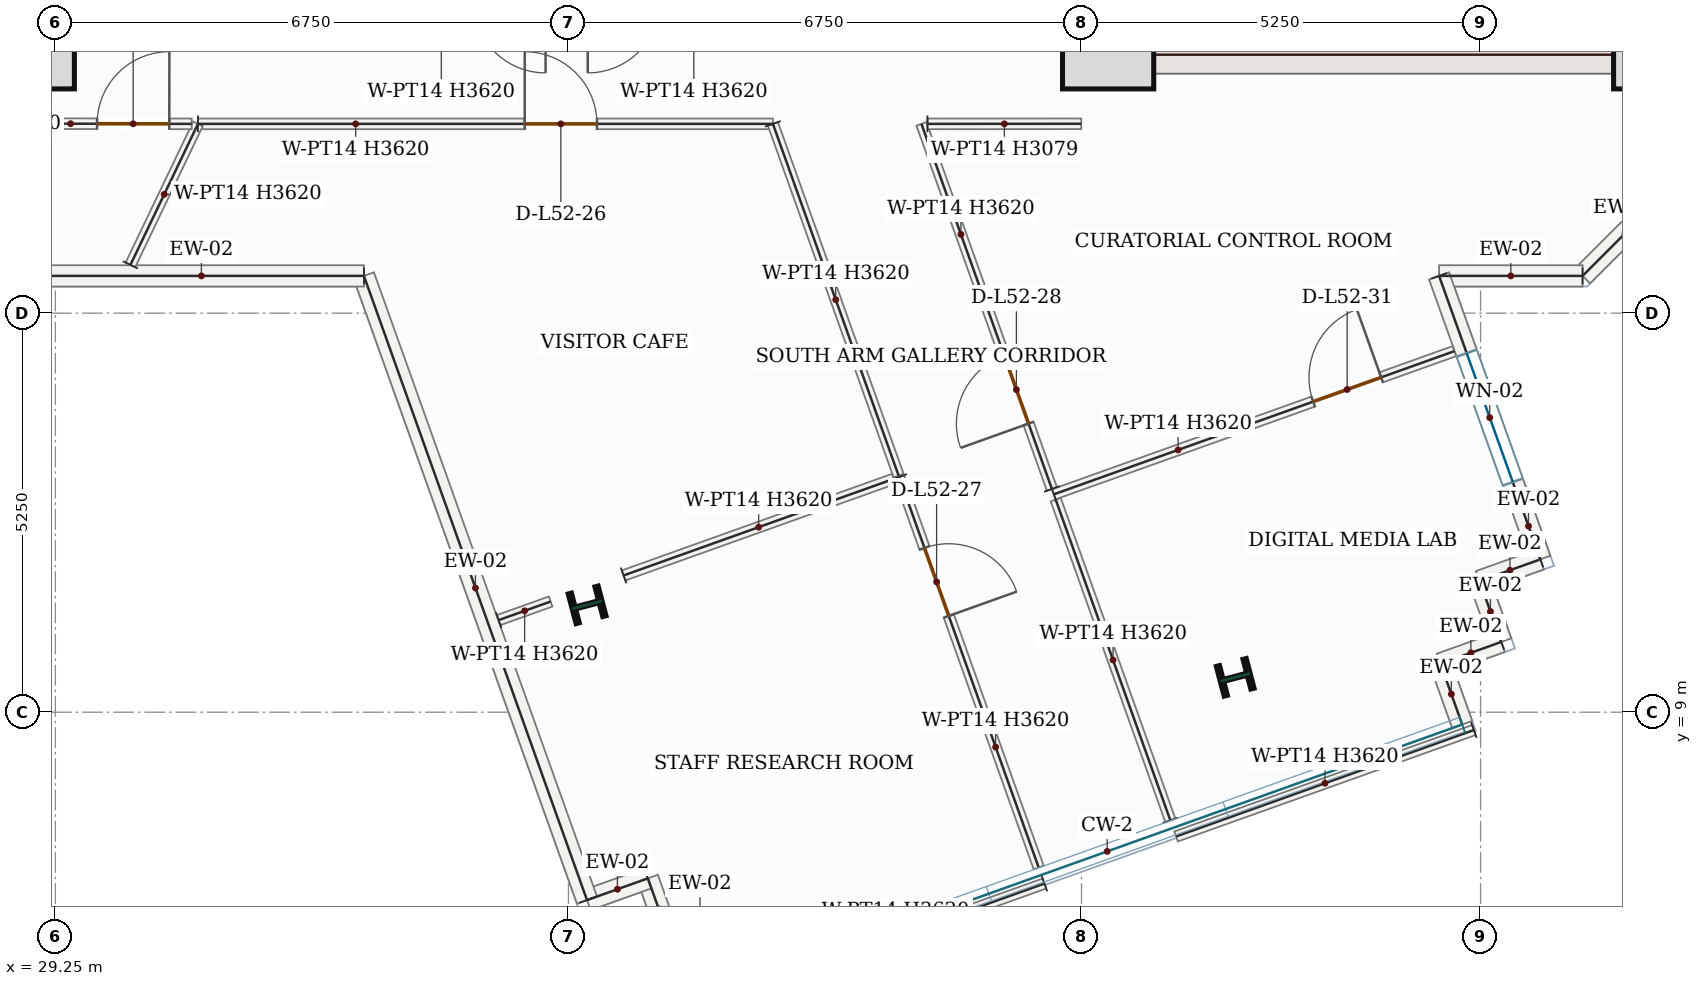
"""IFC4 building model, lengths in metres.
Left out: names, types, materials, properties, quantities, classifications, styles, units other than length and angle.
Written with IfcOpenShell. Run it as: python <this file> out.ifc"""

import sys

from ifc_helpers import new_model, si_unit, direction, frame, frame_2d, origin, origin_2d, place, context, subcontext, project, spatial, rectangle, i_section, extrude, source, transform, mapped, element, fill, save


model = new_model("IFC4")
c1 = context("Model", 3, precision=1e-05, world=origin(), true_north=direction((0.0, 1.0)))
c2 = subcontext(c1, "Body", "Model", "MODEL_VIEW")
j1 = project(units=[si_unit("LENGTHUNIT", "METRE"), si_unit("PLANEANGLEUNIT", "RADIAN")], contexts=[c1])
p1 = place(None, origin())
s1 = spatial("IfcSite", under=j1, at=p1, CompositionType="ELEMENT")
p2 = place(p1, origin())
s2 = spatial("IfcBuilding", under=s1, at=p2, CompositionType="ELEMENT")
p3 = place(p2, frame((0.0, 0.0, 221.4)))
s3 = spatial("IfcBuildingStorey", under=s2, at=p3, CompositionType="ELEMENT", Elevation=221.4)
p4 = place(p3, frame((29.0, 17.4, 0.0), z_axis=(0.0, 0.0, 1.0), x_axis=(0.0, 1.0, 0.0)))
e1 = element("IfcWall", 1, at=p4, inside=s3, PredefinedType="SHEAR", context=c2, shape_type="SweptSolid", body=[
    extrude(rectangle(XDim=8.55, YDim=0.5, at=frame_2d((4.275, 0.0))), origin(), (0.0, 0.0, 1.0), 3.62),
])
p5 = place(p4, frame((6.65, 0.0, 0.0)))
e2 = element("IfcOpeningElement", 2, at=p5, cuts=e1, PredefinedType="OPENING", context=c2, shape_type="SweptSolid", body=[
    extrude(rectangle(XDim=1.1, YDim=2.2, at=frame_2d((0.55, 1.1))), frame((0.0, 0.26, 0.0), z_axis=(0.0, -1.0, 0.0), x_axis=(1.0, 0.0, 0.0)), (0.0, 0.0, 1.0), 0.52),
])
p6 = place(p4, frame((2.15, 0.0, 0.0)))
e3 = element("IfcOpeningElement", 3, at=p6, cuts=e1, PredefinedType="OPENING", context=c2, shape_type="SweptSolid", body=[
    extrude(rectangle(XDim=0.88, YDim=2.1, at=frame_2d((0.44, 1.05))), frame((0.0, 0.26, 0.0), z_axis=(0.0, -1.0, 0.0), x_axis=(1.0, 0.0, 0.0)), (0.0, 0.0, 1.0), 0.52),
])
p7 = place(p4, frame((4.25, 0.0, 0.0)))
e4 = element("IfcOpeningElement", 4, at=p7, cuts=e1, PredefinedType="OPENING", context=c2, shape_type="SweptSolid", body=[
    extrude(rectangle(XDim=0.88, YDim=2.1, at=frame_2d((0.44, 1.05))), frame((0.0, 0.26, 0.0), z_axis=(0.0, -1.0, 0.0), x_axis=(1.0, 0.0, 0.0)), (0.0, 0.0, 1.0), 0.52),
])
p8 = place(p3, frame((43.0, 17.4, 0.0), z_axis=(0.0, 0.0, 1.0), x_axis=(0.0, 1.0, 0.0)))
e5 = element("IfcWall", 5, at=p8, inside=s3, PredefinedType="SHEAR", context=c2, shape_type="SweptSolid", body=[
    extrude(rectangle(XDim=8.55, YDim=0.5, at=frame_2d((4.275, 0.0))), origin(), (0.0, 0.0, 1.0), 3.62),
])
p9 = place(p8, frame((6.65, 0.0, 0.0)))
e6 = element("IfcOpeningElement", 6, at=p9, cuts=e5, PredefinedType="OPENING", context=c2, shape_type="SweptSolid", body=[
    extrude(rectangle(XDim=1.1, YDim=2.2, at=frame_2d((0.55, 1.1))), frame((0.0, 0.26, 0.0), z_axis=(0.0, -1.0, 0.0), x_axis=(1.0, 0.0, 0.0)), (0.0, 0.0, 1.0), 0.52),
])
p10 = place(p8, frame((1.75, 0.0, 0.0)))
e7 = element("IfcOpeningElement", 7, at=p10, cuts=e5, PredefinedType="OPENING", context=c2, shape_type="SweptSolid", body=[
    extrude(rectangle(XDim=1.3, YDim=2.2, at=frame_2d((0.65, 1.1))), frame((0.0, 0.26, 0.0), z_axis=(0.0, -1.0, 0.0), x_axis=(1.0, 0.0, 0.0)), (0.0, 0.0, 1.0), 0.52),
])
p11 = place(p8, frame((4.55, 0.0, 0.0)))
e8 = element("IfcOpeningElement", 8, at=p11, cuts=e5, PredefinedType="OPENING", context=c2, shape_type="SweptSolid", body=[
    extrude(rectangle(XDim=0.88, YDim=2.1, at=frame_2d((0.44, 1.05))), frame((0.0, 0.26, 0.0), z_axis=(0.0, -1.0, 0.0), x_axis=(1.0, 0.0, 0.0)), (0.0, 0.0, 1.0), 0.52),
])
m1 = source(origin(), c2, "Body", "SweptSolid", [
    extrude(rectangle(XDim=7.0, YDim=0.5, at=frame_2d((3.5, 0.0))), origin(), (0.0, 0.0, 1.0), 3.62),
])
p12 = place(p3, frame((43.25, 17.65, 0.0), z_axis=(0.0, 0.0, 1.0), x_axis=(1.0, 0.0, 0.0)))
e9 = element("IfcWall", 9, at=p12, inside=s3, PredefinedType="SHEAR", context=c2, shape_type="MappedRepresentation", body=[
    mapped(m1, transform((0.0, 0.0, 0.0), x_axis=(1.0, 0.0, 0.0), y_axis=(0.0, 1.0, 0.0), z_axis=(0.0, 0.0, 1.0), scale=1.0)),
])
m2 = source(origin(), c2, "Body", "SweptSolid", [
    extrude(rectangle(XDim=1.2, YDim=1.2, at=origin_2d()), origin(), (0.0, 0.0, 1.0), 3.9),
])
for number, where, z_axis, x_axis in (
    (10, (28.9, 17.8, 0.0), (0.0, 0.0, 1.0), (1.0, 0.0, 0.0)),
    (11, (43.1, 17.8, 0.0), (0.0, 0.0, 1.0), (1.0, 0.0, 0.0)),
    (12, (50.35, 17.8, 0.0), (0.0, 0.0, 1.0), (1.0, 0.0, 0.0)),
):
    element("IfcColumn", number, at=place(p3, frame(where, z_axis=z_axis, x_axis=x_axis)), inside=s3, PredefinedType="COLUMN", context=c2, shape_type="MappedRepresentation", body=[
        mapped(m2, transform((0.0, 0.0, 0.0), x_axis=(1.0, 0.0, 0.0), y_axis=(0.0, 1.0, 0.0), z_axis=(0.0, 0.0, 1.0), scale=1.0)),
    ])
m3 = source(origin(), c2, "Body", "SweptSolid", [
    extrude(i_section(OverallWidth=0.404, OverallDepth=0.407, WebThickness=0.027, FlangeThickness=0.044, FilletRadius=0.018, at=origin_2d()), origin(), (0.0, 0.0, 1.0), 3.9),
])
for number, where, z_axis, x_axis in (
    (13, (36.245, 10.412, 0.0), (0.0, 0.0, 1.0), (-0.255, 0.967, 0.0)),
    (14, (44.772, 9.459, 0.0), (0.0, 0.0, 1.0), (-0.255, 0.967, 0.0)),
):
    element("IfcColumn", number, at=place(p3, frame(where, z_axis=z_axis, x_axis=x_axis)), inside=s3, PredefinedType="COLUMN", context=c2, shape_type="MappedRepresentation", body=[
        mapped(m3, transform((0.0, 0.0, 0.0), x_axis=(1.0, 0.0, 0.0), y_axis=(0.0, 1.0, 0.0), z_axis=(0.0, 0.0, 1.0), scale=1.0)),
    ])
p13 = place(p3, frame((53.06, 18.458, 0.0), z_axis=(0.0, 0.0, 1.0), x_axis=(-0.707106781187, -0.707106781187, 0.0)))
e15 = element("IfcWall", 15, at=p13, inside=s3, PredefinedType="SOLIDWALL", context=c2, shape_type="SweptSolid", body=[
    extrude(rectangle(XDim=5.258, YDim=0.28, at=frame_2d((2.629, 0.0))), origin(), (0.0, 0.0, 1.0), 3.62),
])
p14 = place(p13, frame((1.729, 0.0, 0.85)))
e16 = element("IfcOpeningElement", 16, at=p14, cuts=e15, PredefinedType="OPENING", context=c2, shape_type="SweptSolid", body=[
    extrude(rectangle(XDim=1.8, YDim=1.75, at=frame_2d((0.9, 0.875))), frame((0.0, 0.15, 0.0), z_axis=(0.0, -1.0, 0.0), x_axis=(1.0, 0.0, 0.0)), (0.0, 0.0, 1.0), 0.3),
])
m4 = source(origin(), c2, "Body", "SweptSolid", [
    extrude(rectangle(XDim=1.888, YDim=0.28, at=frame_2d((0.944, 0.0))), origin(), (0.0, 0.0, 1.0), 3.62),
])
p15 = place(p3, frame((49.342, 14.74, 0.0), z_axis=(0.0, 0.0, 1.0), x_axis=(-1.0, 0.0, 0.0)))
e17 = element("IfcWall", 17, at=p15, inside=s3, PredefinedType="SOLIDWALL", context=c2, shape_type="MappedRepresentation", body=[
    mapped(m4, transform((0.0, 0.0, 0.0), x_axis=(1.0, 0.0, 0.0), y_axis=(0.0, 1.0, 0.0), z_axis=(0.0, 0.0, 1.0), scale=1.0)),
])
p16 = place(p3, frame((47.454, 14.74, 0.0), z_axis=(0.0, 0.0, 1.0), x_axis=(0.336590223561, -0.941651220677, 0.0)))
e18 = element("IfcWall", 18, at=p16, inside=s3, PredefinedType="SOLIDWALL", context=c2, shape_type="SweptSolid", body=[
    extrude(rectangle(XDim=3.96, YDim=0.28, at=frame_2d((1.98, 0.0))), origin(), (0.0, 0.0, 1.0), 3.62),
])
p17 = place(p16, frame((1.08, 0.0, 0.85)))
e19 = element("IfcOpeningElement", 19, at=p17, cuts=e18, PredefinedType="OPENING", context=c2, shape_type="SweptSolid", body=[
    extrude(rectangle(XDim=1.8, YDim=1.75, at=frame_2d((0.9, 0.875))), frame((0.0, 0.15, 0.0), z_axis=(0.0, -1.0, 0.0), x_axis=(1.0, 0.0, 0.0)), (0.0, 0.0, 1.0), 0.3),
])
m5 = source(origin(), c2, "Body", "SweptSolid", [
    extrude(rectangle(XDim=0.85, YDim=0.28, at=frame_2d((0.425, 0.0))), origin(), (0.0, 0.0, 1.0), 3.62),
])
p18 = place(p3, frame((48.787, 11.011, 0.0), z_axis=(0.0, 0.0, 1.0), x_axis=(-0.941657417713, -0.336572886112, 0.0)))
e20 = element("IfcWall", 20, at=p18, inside=s3, PredefinedType="SOLIDWALL", context=c2, shape_type="MappedRepresentation", body=[
    mapped(m5, transform((0.0, 0.0, 0.0), x_axis=(1.0, 0.0, 0.0), y_axis=(0.0, 1.0, 0.0), z_axis=(0.0, 0.0, 1.0), scale=1.0)),
])
m6 = source(origin(), c2, "Body", "SweptSolid", [
    extrude(rectangle(XDim=0.85, YDim=0.28, at=frame_2d((0.425, 0.0))), origin(), (0.0, 0.0, 1.0), 3.62),
])
for number, where, z_axis, x_axis in (
    (21, (47.987, 10.725, 0.0), (0.0, 0.0, 1.0), (0.337, -0.942, 0.0)),
    (22, (48.273, 9.924, 0.0), (0.0, 0.0, 1.0), (-0.942, -0.337, 0.0)),
    (23, (47.472, 9.638, 0.0), (0.0, 0.0, 1.0), (0.336, -0.942, 0.0)),
    (24, (37.331, 6.014, 0.0), (0.0, 0.0, 1.0), (-0.337, 0.942, 0.0)),
    (25, (37.044, 6.814, 0.0), (0.0, 0.0, 1.0), (-0.942, -0.337, 0.0)),
):
    element("IfcWall", number, at=place(p3, frame(where, z_axis=z_axis, x_axis=x_axis)), inside=s3, PredefinedType="SOLIDWALL", context=c2, shape_type="MappedRepresentation", body=[
        mapped(m6, transform((0.0, 0.0, 0.0), x_axis=(1.0, 0.0, 0.0), y_axis=(0.0, 1.0, 0.0), z_axis=(0.0, 0.0, 1.0), scale=1.0)),
    ])
m7 = source(origin(), c2, "Body", "SweptSolid", [
    extrude(rectangle(XDim=8.721, YDim=0.28, at=frame_2d((4.36, 0.0))), origin(), (0.0, 0.0, 1.0), 3.62),
])
p19 = place(p3, frame((36.244, 6.528, 0.0), z_axis=(0.0, 0.0, 1.0), x_axis=(-0.336554520074, 0.941663982011, 0.0)))
e26 = element("IfcWall", 26, at=p19, inside=s3, PredefinedType="SOLIDWALL", context=c2, shape_type="MappedRepresentation", body=[
    mapped(m7, transform((0.0, 0.0, 0.0), x_axis=(1.0, 0.0, 0.0), y_axis=(0.0, 1.0, 0.0), z_axis=(0.0, 0.0, 1.0), scale=1.0)),
])
p20 = place(p3, frame((33.309, 14.74, 0.0), z_axis=(0.0, 0.0, 1.0), x_axis=(-1.0, 0.0, 0.0)))
e27 = element("IfcWall", 27, at=p20, inside=s3, PredefinedType="SOLIDWALL", context=c2, shape_type="SweptSolid", body=[
    extrude(rectangle(XDim=10.651, YDim=0.28, at=frame_2d((5.326, 0.0))), origin(), (0.0, 0.0, 1.0), 3.62),
])
p21 = place(p20, frame((7.681, 0.0, 0.0)))
e28 = element("IfcOpeningElement", 28, at=p21, cuts=e27, PredefinedType="OPENING", context=c2, shape_type="SweptSolid", body=[
    extrude(rectangle(XDim=1.05, YDim=2.15, at=frame_2d((0.525, 1.075))), frame((0.0, 0.15, 0.0), z_axis=(0.0, -1.0, 0.0), x_axis=(1.0, 0.0, 0.0)), (0.0, 0.0, 1.0), 0.3),
])
p22 = place(p20, frame((4.426, 0.0, 0.85)))
e29 = element("IfcOpeningElement", 29, at=p22, cuts=e27, PredefinedType="OPENING", context=c2, shape_type="SweptSolid", body=[
    extrude(rectangle(XDim=1.8, YDim=1.75, at=frame_2d((0.9, 0.875))), frame((0.0, 0.15, 0.0), z_axis=(0.0, -1.0, 0.0), x_axis=(1.0, 0.0, 0.0)), (0.0, 0.0, 1.0), 0.3),
])
p23 = place(p3, frame((42.386, 11.866, 0.0), z_axis=(0.0, 0.0, 1.0), x_axis=(0.94166093099, 0.336563056568, 0.0)))
e30 = element("IfcWall", 30, at=p23, inside=s3, PredefinedType="PARTITIONING", context=c2, shape_type="SweptSolid", body=[
    extrude(rectangle(XDim=5.595, YDim=0.14, at=frame_2d((2.797, 0.0))), origin(), (0.0, 0.0, 1.0), 3.62),
])
p24 = place(p23, frame((3.623, 0.0, 0.0)))
e31 = element("IfcOpeningElement", 31, at=p24, cuts=e30, PredefinedType="OPENING", context=c2, shape_type="SweptSolid", body=[
    extrude(rectangle(XDim=0.95, YDim=2.15, at=frame_2d((0.475, 1.075))), frame((0.0, 0.08, 0.0), z_axis=(0.0, -1.0, 0.0), x_axis=(1.0, 0.0, 0.0)), (0.0, 0.0, 1.0), 0.16),
])
m8 = source(origin(), c2, "Body", "SweptSolid", [
    extrude(rectangle(XDim=4.16, YDim=0.14, at=frame_2d((2.08, 0.0))), origin(), (0.0, 0.0, 1.0), 3.62),
])
p25 = place(p3, frame((47.912, 8.765, 0.0), z_axis=(0.0, 0.0, 1.0), x_axis=(-0.94167417377, -0.336526002642, 0.0)))
e32 = element("IfcWall", 32, at=p25, inside=s3, PredefinedType="PARTITIONING", context=c2, shape_type="MappedRepresentation", body=[
    mapped(m8, transform((0.0, 0.0, 0.0), x_axis=(1.0, 0.0, 0.0), y_axis=(0.0, 1.0, 0.0), z_axis=(0.0, 0.0, 1.0), scale=1.0)),
])
m9 = source(origin(), c2, "Body", "SweptSolid", [
    extrude(rectangle(XDim=4.48, YDim=0.14, at=frame_2d((2.24, 0.0))), origin(), (0.0, 0.0, 1.0), 3.62),
])
p26 = place(p3, frame((43.919, 7.577, 0.0), z_axis=(0.0, 0.0, 1.0), x_axis=(-0.336557324255, 0.941662979781, 0.0)))
e33 = element("IfcWall", 33, at=p26, inside=s3, PredefinedType="PARTITIONING", context=c2, shape_type="MappedRepresentation", body=[
    mapped(m9, transform((0.0, 0.0, 0.0), x_axis=(1.0, 0.0, 0.0), y_axis=(0.0, 1.0, 0.0), z_axis=(0.0, 0.0, 1.0), scale=1.0)),
])
p27 = place(p3, frame((40.35, 12.094, 0.0), z_axis=(0.0, 0.0, 1.0), x_axis=(0.336563203689, -0.941660878407, 0.0)))
e34 = element("IfcWall", 34, at=p27, inside=s3, PredefinedType="PARTITIONING", context=c2, shape_type="SweptSolid", body=[
    extrude(rectangle(XDim=5.455, YDim=0.14, at=frame_2d((2.728, 0.0))), origin(), (0.0, 0.0, 1.0), 3.62),
])
p28 = place(p27, frame((0.991, 0.0, 0.0)))
e35 = element("IfcOpeningElement", 35, at=p28, cuts=e34, PredefinedType="OPENING", context=c2, shape_type="SweptSolid", body=[
    extrude(rectangle(XDim=0.95, YDim=2.15, at=frame_2d((0.475, 1.075))), frame((0.0, 0.08, 0.0), z_axis=(0.0, -1.0, 0.0), x_axis=(1.0, 0.0, 0.0)), (0.0, 0.0, 1.0), 0.16),
])
p29 = place(p3, frame((42.262, 6.746, 0.0), z_axis=(0.0, 0.0, 1.0), x_axis=(-0.94167417377, -0.336526002642, 0.0)))
e36 = element("IfcWall", 36, at=p29, inside=s3, PredefinedType="PARTITIONING", context=c2, shape_type="MappedRepresentation", body=[
    mapped(m8, transform((0.0, 0.0, 0.0), x_axis=(1.0, 0.0, 0.0), y_axis=(0.0, 1.0, 0.0), z_axis=(0.0, 0.0, 1.0), scale=1.0)),
])
m10 = source(origin(), c2, "Body", "SweptSolid", [
    extrude(rectangle(XDim=0.726, YDim=0.14, at=frame_2d((0.363, 0.0))), origin(), (0.0, 0.0, 1.0), 3.62),
])
p30 = place(p3, frame((35.082, 10.212, 0.0), z_axis=(0.0, 0.0, 1.0), x_axis=(0.941779940629, 0.33622989669, 0.0)))
e37 = element("IfcWall", 37, at=p30, inside=s3, PredefinedType="PARTITIONING", context=c2, shape_type="MappedRepresentation", body=[
    mapped(m10, transform((0.0, 0.0, 0.0), x_axis=(1.0, 0.0, 0.0), y_axis=(0.0, 1.0, 0.0), z_axis=(0.0, 0.0, 1.0), scale=1.0)),
])
m11 = source(origin(), c2, "Body", "SweptSolid", [
    extrude(rectangle(XDim=3.774, YDim=0.14, at=frame_2d((1.887, 0.0))), origin(), (0.0, 0.0, 1.0), 3.62),
])
p31 = place(p3, frame((36.725, 10.799, 0.0), z_axis=(0.0, 0.0, 1.0), x_axis=(0.94166578898, 0.336549464216, 0.0)))
e38 = element("IfcWall", 38, at=p31, inside=s3, PredefinedType="PARTITIONING", context=c2, shape_type="MappedRepresentation", body=[
    mapped(m11, transform((0.0, 0.0, 0.0), x_axis=(1.0, 0.0, 0.0), y_axis=(0.0, 1.0, 0.0), z_axis=(0.0, 0.0, 1.0), scale=1.0)),
])
p32 = place(p3, frame((31.126, 16.74, 0.0), z_axis=(0.0, 0.0, 1.0), x_axis=(1.0, 0.0, 0.0)))
e39 = element("IfcWall", 39, at=p32, inside=s3, PredefinedType="PARTITIONING", context=c2, shape_type="SweptSolid", body=[
    extrude(rectangle(XDim=7.564, YDim=0.14, at=frame_2d((3.782, 0.0))), origin(), (0.0, 0.0, 1.0), 3.62),
])
p33 = place(p32, frame((4.299, 0.0, 0.0)))
e40 = element("IfcOpeningElement", 40, at=p33, cuts=e39, PredefinedType="OPENING", context=c2, shape_type="SweptSolid", body=[
    extrude(rectangle(XDim=0.95, YDim=2.15, at=frame_2d((0.475, 1.075))), frame((0.0, 0.08, 0.0), z_axis=(0.0, -1.0, 0.0), x_axis=(1.0, 0.0, 0.0)), (0.0, 0.0, 1.0), 0.16),
])
m12 = source(origin(), c2, "Body", "SweptSolid", [
    extrude(rectangle(XDim=4.913, YDim=0.14, at=frame_2d((2.457, 0.0))), origin(), (0.0, 0.0, 1.0), 3.62),
])
p34 = place(p3, frame((38.69, 16.74, 0.0), z_axis=(0.0, 0.0, 1.0), x_axis=(0.336547288081, -0.941666566724, 0.0)))
e41 = element("IfcWall", 41, at=p34, inside=s3, PredefinedType="PARTITIONING", context=c2, shape_type="MappedRepresentation", body=[
    mapped(m12, transform((0.0, 0.0, 0.0), x_axis=(1.0, 0.0, 0.0), y_axis=(0.0, 1.0, 0.0), z_axis=(0.0, 0.0, 1.0), scale=1.0)),
])
m13 = source(origin(), c2, "Body", "SweptSolid", [
    extrude(rectangle(XDim=2.057, YDim=0.14, at=frame_2d((1.028, 0.0))), origin(), (0.0, 0.0, 1.0), 3.62),
])
p35 = place(p3, frame((30.237, 14.885, 0.0), z_axis=(0.0, 0.0, 1.0), x_axis=(0.43214833388, 0.90180253799, 0.0)))
e42 = element("IfcWall", 42, at=p35, inside=s3, PredefinedType="PARTITIONING", context=c2, shape_type="MappedRepresentation", body=[
    mapped(m13, transform((0.0, 0.0, 0.0), x_axis=(1.0, 0.0, 0.0), y_axis=(0.0, 1.0, 0.0), z_axis=(0.0, 0.0, 1.0), scale=1.0)),
])
p36 = place(p3, frame((42.361, 11.937, 0.0), z_axis=(0.0, 0.0, 1.0), x_axis=(-0.336588056289, 0.941651995359, 0.0)))
e43 = element("IfcWall", 43, at=p36, inside=s3, PredefinedType="PARTITIONING", context=c2, shape_type="SweptSolid", body=[
    extrude(rectangle(XDim=5.101, YDim=0.14, at=frame_2d((2.55, 0.0))), origin(), (0.0, 0.0, 1.0), 3.62),
])
p37 = place(p36, frame((0.913, 0.0, 0.0)))
e44 = element("IfcOpeningElement", 44, at=p37, cuts=e43, PredefinedType="OPENING", context=c2, shape_type="SweptSolid", body=[
    extrude(rectangle(XDim=0.95, YDim=2.15, at=frame_2d((0.475, 1.075))), frame((0.0, 0.08, 0.0), z_axis=(0.0, -1.0, 0.0), x_axis=(1.0, 0.0, 0.0)), (0.0, 0.0, 1.0), 0.16),
])
m14 = source(origin(), c2, "Body", "SweptSolid", [
    extrude(rectangle(XDim=2.023, YDim=0.14, at=frame_2d((1.012, 0.0))), origin(), (0.0, 0.0, 1.0), 3.079),
])
p38 = place(p3, frame((40.723, 16.74, 0.0), z_axis=(0.0, 0.0, 1.0), x_axis=(0.999999817982, 0.000603354542, 0.0)))
e45 = element("IfcWall", 45, at=p38, inside=s3, PredefinedType="PARTITIONING", context=c2, shape_type="MappedRepresentation", body=[
    mapped(m14, transform((0.0, 0.0, 0.0), x_axis=(1.0, 0.0, 0.0), y_axis=(0.0, 1.0, 0.0), z_axis=(0.0, 0.0, 1.0), scale=1.0)),
])
p39 = place(p3, frame((29.252, 16.743, 0.0), z_axis=(0.0, 0.0, 1.0), x_axis=(0.999998876126, -0.00149924869, 0.0)))
e46 = element("IfcWall", 46, at=p39, inside=s3, PredefinedType="PARTITIONING", context=c2, shape_type="SweptSolid", body=[
    extrude(rectangle(XDim=1.791, YDim=0.14, at=frame_2d((0.896, 0.0))), origin(), (0.0, 0.0, 1.0), 3.62),
])
p40 = place(p39, frame((0.547, 0.0, 0.0)))
e47 = element("IfcOpeningElement", 47, at=p40, cuts=e46, PredefinedType="OPENING", context=c2, shape_type="SweptSolid", body=[
    extrude(rectangle(XDim=0.95, YDim=2.15, at=frame_2d((0.475, 1.075))), frame((0.0, 0.08, 0.0), z_axis=(0.0, -1.0, 0.0), x_axis=(1.0, 0.0, 0.0)), (0.0, 0.0, 1.0), 0.16),
])
m15 = source(origin(), c2, "Body", "SweptSolid", [
    extrude(rectangle(XDim=1.8, YDim=1.75, at=frame_2d((0.9, 0.875))), frame((0.0, 0.03, 0.0), z_axis=(0.0, -1.0, 0.0), x_axis=(1.0, 0.0, 0.0)), (0.0, 0.0, 1.0), 0.06),
])
p41 = place(p17, origin())
e48 = element("IfcWindow", 48, at=p41, inside=s3, PartitioningType="DOUBLE_PANEL_VERTICAL", PredefinedType="WINDOW", context=c2, shape_type="MappedRepresentation", body=[
    mapped(m15, transform((0.0, 0.0, 0.0), x_axis=(1.0, 0.0, 0.0), y_axis=(0.0, 1.0, 0.0), z_axis=(0.0, 0.0, 1.0), scale=1.0)),
])
fill(e19, e48)
m16 = source(origin(), c2, "Body", "SweptSolid", [
    extrude(rectangle(XDim=0.95, YDim=2.15, at=frame_2d((0.475, 1.075))), frame((0.0, 0.025, 0.0), z_axis=(0.0, -1.0, 0.0), x_axis=(1.0, 0.0, 0.0)), (0.0, 0.0, 1.0), 0.05),
])
p42 = place(p40, origin())
e49 = element("IfcDoor", 49, at=p42, inside=s3, OperationType="SINGLE_SWING_RIGHT", PredefinedType="DOOR", context=c2, shape_type="MappedRepresentation", body=[
    mapped(m16, transform((0.0, 0.0, 0.0), x_axis=(1.0, 0.0, 0.0), y_axis=(0.0, 1.0, 0.0), z_axis=(0.0, 0.0, 1.0), scale=1.0)),
])
fill(e47, e49)
p43 = place(p33, origin())
e50 = element("IfcDoor", 50, at=p43, inside=s3, OperationType="SINGLE_SWING_LEFT", PredefinedType="DOOR", context=c2, shape_type="MappedRepresentation", body=[
    mapped(m16, transform((0.0, 0.0, 0.0), x_axis=(1.0, 0.0, 0.0), y_axis=(0.0, 1.0, 0.0), z_axis=(0.0, 0.0, 1.0), scale=1.0)),
])
fill(e40, e50)
p44 = place(p28, origin())
e51 = element("IfcDoor", 51, at=p44, inside=s3, OperationType="SINGLE_SWING_RIGHT", PredefinedType="DOOR", context=c2, shape_type="MappedRepresentation", body=[
    mapped(m16, transform((0.0, 0.0, 0.0), x_axis=(1.0, 0.0, 0.0), y_axis=(0.0, 1.0, 0.0), z_axis=(0.0, 0.0, 1.0), scale=1.0)),
])
fill(e35, e51)
p45 = place(p37, origin())
e52 = element("IfcDoor", 52, at=p45, inside=s3, OperationType="SINGLE_SWING_LEFT", PredefinedType="DOOR", context=c2, shape_type="MappedRepresentation", body=[
    mapped(m16, transform((0.0, 0.0, 0.0), x_axis=(1.0, 0.0, 0.0), y_axis=(0.0, 1.0, 0.0), z_axis=(0.0, 0.0, 1.0), scale=1.0)),
])
fill(e44, e52)
p46 = place(p24, origin())
e53 = element("IfcDoor", 53, at=p46, inside=s3, OperationType="SINGLE_SWING_RIGHT", PredefinedType="DOOR", context=c2, shape_type="MappedRepresentation", body=[
    mapped(m16, transform((0.0, 0.0, 0.0), x_axis=(1.0, 0.0, 0.0), y_axis=(0.0, 1.0, 0.0), z_axis=(0.0, 0.0, 1.0), scale=1.0)),
])
fill(e31, e53)
save(model, sys.argv[1])
